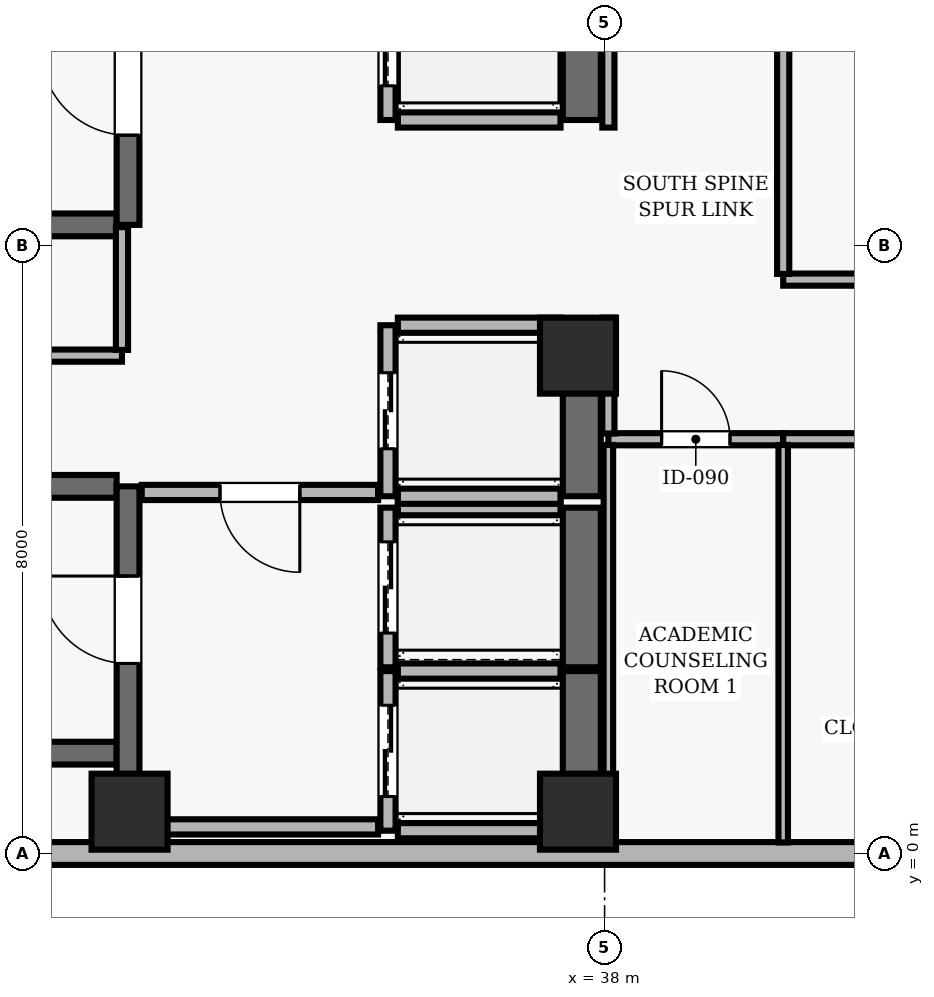
"""IFC4 building model, lengths in metres.
Left out: names, types, materials, properties, quantities, classifications, styles, units other than length and angle.
Written with IfcOpenShell. Run it as: python <this file> out.ifc"""

import sys

from ifc_helpers import new_model, si_unit, direction, frame, frame_2d, origin, origin_2d, place, context, subcontext, project, spatial, rectangle, extrude, element, fill, save


model = new_model("IFC4")
c1 = context("Model", 3, precision=1e-05, world=origin(), true_north=direction((0.0, 1.0)))
c2 = subcontext(c1, "Body", "Model", "MODEL_VIEW")
j1 = project(units=[si_unit("LENGTHUNIT", "METRE"), si_unit("PLANEANGLEUNIT", "RADIAN")], contexts=[c1])
p1 = place(None, origin())
s1 = spatial("IfcSite", under=j1, at=p1, CompositionType="ELEMENT")
p2 = place(p1, origin())
s2 = spatial("IfcBuilding", under=s1, at=p2, CompositionType="ELEMENT")
p3 = place(p2, frame((0.0, 0.0, 226.5)))
s3 = spatial("IfcBuildingStorey", under=s2, at=p3, CompositionType="ELEMENT", Elevation=226.5)
for number, where, z_axis, x_axis in (
    (1, (31.75, 0.55, 0.0), (0.0, 0.0, 1.0), (1.0, 0.0, 0.0)),
    (2, (37.65, 0.55, 0.0), (0.0, 0.0, 1.0), (1.0, 0.0, 0.0)),
    (3, (37.65, 6.55, 0.0), (0.0, 0.0, 1.0), (1.0, 0.0, 0.0)),
):
    element("IfcColumn", number, at=place(p3, frame(where, z_axis=z_axis, x_axis=x_axis)), inside=s3, PredefinedType="COLUMN", context=c2, shape_type="SweptSolid", body=[
        extrude(rectangle(XDim=1.0, YDim=1.0, at=origin_2d()), origin(), (0.0, 0.0, 1.0), 3.9),
    ])
p4 = place(p3, frame((24.5, 0.0, 0.0), z_axis=(0.0, 0.0, 1.0), x_axis=(1.0, 0.0, 0.0)))
e4 = element("IfcWall", 4, at=p4, inside=s3, PredefinedType="SOLIDWALL", context=c2, shape_type="SweptSolid", body=[
    extrude(rectangle(XDim=38.2, YDim=0.3, at=frame_2d((19.1, 0.0))), origin(), (0.0, 0.0, 1.0), 3.69),
])
p5 = place(p4, frame((1.529, 0.0, 0.9)))
e5 = element("IfcOpeningElement", 5, at=p5, cuts=e4, PredefinedType="OPENING", context=c2, shape_type="SweptSolid", body=[
    extrude(rectangle(XDim=2.4, YDim=1.8, at=frame_2d((1.2, 0.9))), frame((0.0, 0.16, 0.0), z_axis=(0.0, -1.0, 0.0), x_axis=(1.0, 0.0, 0.0)), (0.0, 0.0, 1.0), 0.32),
])
p6 = place(p4, frame((17.9, 0.0, 0.9)))
e6 = element("IfcOpeningElement", 6, at=p6, cuts=e4, PredefinedType="OPENING", context=c2, shape_type="SweptSolid", body=[
    extrude(rectangle(XDim=2.4, YDim=1.8, at=frame_2d((1.2, 0.9))), frame((0.0, 0.16, 0.0), z_axis=(0.0, -1.0, 0.0), x_axis=(1.0, 0.0, 0.0)), (0.0, 0.0, 1.0), 0.32),
])
p7 = place(p4, frame((24.257, 0.0, 0.9)))
e7 = element("IfcOpeningElement", 7, at=p7, cuts=e4, PredefinedType="OPENING", context=c2, shape_type="SweptSolid", body=[
    extrude(rectangle(XDim=2.4, YDim=1.8, at=frame_2d((1.2, 0.9))), frame((0.0, 0.16, 0.0), z_axis=(0.0, -1.0, 0.0), x_axis=(1.0, 0.0, 0.0)), (0.0, 0.0, 1.0), 0.32),
])
p8 = place(p4, frame((28.364, 0.0, 0.9)))
e8 = element("IfcOpeningElement", 8, at=p8, cuts=e4, PredefinedType="OPENING", context=c2, shape_type="SweptSolid", body=[
    extrude(rectangle(XDim=2.4, YDim=1.8, at=frame_2d((1.2, 0.9))), frame((0.0, 0.16, 0.0), z_axis=(0.0, -1.0, 0.0), x_axis=(1.0, 0.0, 0.0)), (0.0, 0.0, 1.0), 0.32),
])
p9 = place(p4, frame((34.271, 0.0, 0.9)))
e9 = element("IfcOpeningElement", 9, at=p9, cuts=e4, PredefinedType="OPENING", context=c2, shape_type="SweptSolid", body=[
    extrude(rectangle(XDim=2.4, YDim=1.8, at=frame_2d((1.2, 0.9))), frame((0.0, 0.16, 0.0), z_axis=(0.0, -1.0, 0.0), x_axis=(1.0, 0.0, 0.0)), (0.0, 0.0, 1.0), 0.32),
])
for number, where, z_axis, x_axis in (
    (10, (31.58, 4.83, 0.0), (0.0, 0.0, 1.0), (-1.0, 0.0, 0.0)),
    (11, (23.22, 1.32, 0.0), (0.0, 0.0, 1.0), (1.0, 0.0, 0.0)),
):
    element("IfcWall", number, at=place(p3, frame(where, z_axis=z_axis, x_axis=x_axis)), inside=s3, PredefinedType="SHEAR", context=c2, shape_type="SweptSolid", body=[
        extrude(rectangle(XDim=8.36, YDim=0.3, at=frame_2d((4.18, 0.0))), origin(), (0.0, 0.0, 1.0), 3.69),
    ])
p10 = place(p3, frame((31.73, 0.96, 0.0), z_axis=(0.0, 0.0, 1.0), x_axis=(0.0, 1.0, 0.0)))
e12 = element("IfcWall", 12, at=p10, inside=s3, PredefinedType="SHEAR", context=c2, shape_type="SweptSolid", body=[
    extrude(rectangle(XDim=3.87, YDim=0.3, at=frame_2d((1.935, 0.0))), origin(), (0.0, 0.0, 1.0), 3.69),
])
p11 = place(p10, frame((1.54, 0.0, 0.0)))
e13 = element("IfcOpeningElement", 13, at=p11, cuts=e12, PredefinedType="OPENING", context=c2, shape_type="SweptSolid", body=[
    extrude(rectangle(XDim=1.15, YDim=2.15, at=frame_2d((0.575, 1.075))), frame((0.0, 0.16, 0.0), z_axis=(0.0, -1.0, 0.0), x_axis=(1.0, 0.0, 0.0)), (0.0, 0.0, 1.0), 0.32),
])
p12 = place(p3, frame((23.22, 8.27, 0.0), z_axis=(0.0, 0.0, 1.0), x_axis=(1.0, 0.0, 0.0)))
e14 = element("IfcWall", 14, at=p12, inside=s3, PredefinedType="SHEAR", context=c2, shape_type="SweptSolid", body=[
    extrude(rectangle(XDim=8.36, YDim=0.3, at=frame_2d((4.18, 0.0))), origin(), (0.0, 0.0, 1.0), 3.69),
])
p13 = place(p3, frame((31.73, 8.27, 0.0), z_axis=(0.0, 0.0, 1.0), x_axis=(0.0, 1.0, 0.0)))
e15 = element("IfcWall", 15, at=p13, inside=s3, PredefinedType="SHEAR", context=c2, shape_type="SweptSolid", body=[
    extrude(rectangle(XDim=3.51, YDim=0.3, at=frame_2d((1.755, 0.0))), origin(), (0.0, 0.0, 1.0), 3.69),
])
p14 = place(p13, frame((1.18, 0.0, 0.0)))
e16 = element("IfcOpeningElement", 16, at=p14, cuts=e15, PredefinedType="OPENING", context=c2, shape_type="SweptSolid", body=[
    extrude(rectangle(XDim=1.15, YDim=2.15, at=frame_2d((0.575, 1.075))), frame((0.0, 0.16, 0.0), z_axis=(0.0, -1.0, 0.0), x_axis=(1.0, 0.0, 0.0)), (0.0, 0.0, 1.0), 0.32),
])
p15 = place(p3, frame((35.15, 2.4, 0.0), z_axis=(0.0, 0.0, 1.0), x_axis=(0.0, -1.0, 0.0)))
e17 = element("IfcWall", 17, at=p15, inside=s3, PredefinedType="SOLIDWALL", context=c2, shape_type="SweptSolid", body=[
    extrude(rectangle(XDim=2.1, YDim=0.2, at=frame_2d((1.05, 0.0))), origin(), (0.0, 0.0, 1.0), 3.69),
])
p16 = place(p15, frame((0.45, 0.0, 0.0)))
e18 = element("IfcOpeningElement", 18, at=p16, cuts=e17, PredefinedType="OPENING", context=c2, shape_type="SweptSolid", body=[
    extrude(rectangle(XDim=1.2, YDim=2.15, at=frame_2d((0.6, 1.075))), frame((0.0, 0.11, 0.0), z_axis=(0.0, -1.0, 0.0), x_axis=(1.0, 0.0, 0.0)), (0.0, 0.0, 1.0), 0.22),
])
p17 = place(p3, frame((37.7, 0.3, 0.0), z_axis=(0.0, 0.0, 1.0), x_axis=(0.0, 1.0, 0.0)))
e19 = element("IfcWall", 19, at=p17, inside=s3, PredefinedType="SHEAR", context=c2, shape_type="SweptSolid", body=[
    extrude(rectangle(XDim=2.1, YDim=0.5, at=frame_2d((1.05, 0.0))), origin(), (0.0, 0.0, 1.0), 3.69),
])
for number, where, z_axis, x_axis in (
    (20, (35.28, 0.3, 0.0), (0.0, 0.0, 1.0), (1.0, 0.0, 0.0)),
    (21, (37.42, 2.4, 0.0), (0.0, 0.0, 1.0), (-1.0, 0.0, 0.0)),
):
    element("IfcWall", number, at=place(p3, frame(where, z_axis=z_axis, x_axis=x_axis)), inside=s3, PredefinedType="SOLIDWALL", context=c2, shape_type="SweptSolid", body=[
        extrude(rectangle(XDim=2.14, YDim=0.2, at=frame_2d((1.07, 0.0))), origin(), (0.0, 0.0, 1.0), 3.69),
    ])
p18 = place(p3, frame((35.15, 4.55, 0.0), z_axis=(0.0, 0.0, 1.0), x_axis=(0.0, -1.0, 0.0)))
e22 = element("IfcWall", 22, at=p18, inside=s3, PredefinedType="SOLIDWALL", context=c2, shape_type="SweptSolid", body=[
    extrude(rectangle(XDim=2.1, YDim=0.2, at=frame_2d((1.05, 0.0))), origin(), (0.0, 0.0, 1.0), 3.69),
])
p19 = place(p18, frame((0.45, 0.0, 0.0)))
e23 = element("IfcOpeningElement", 23, at=p19, cuts=e22, PredefinedType="OPENING", context=c2, shape_type="SweptSolid", body=[
    extrude(rectangle(XDim=1.2, YDim=2.15, at=frame_2d((0.6, 1.075))), frame((0.0, 0.11, 0.0), z_axis=(0.0, -1.0, 0.0), x_axis=(1.0, 0.0, 0.0)), (0.0, 0.0, 1.0), 0.22),
])
p20 = place(p3, frame((37.7, 2.45, 0.0), z_axis=(0.0, 0.0, 1.0), x_axis=(0.0, 1.0, 0.0)))
e24 = element("IfcWall", 24, at=p20, inside=s3, PredefinedType="SHEAR", context=c2, shape_type="SweptSolid", body=[
    extrude(rectangle(XDim=2.1, YDim=0.5, at=frame_2d((1.05, 0.0))), origin(), (0.0, 0.0, 1.0), 3.69),
])
p21 = place(p3, frame((37.42, 4.55, 0.0), z_axis=(0.0, 0.0, 1.0), x_axis=(-1.0, 0.0, 0.0)))
e25 = element("IfcWall", 25, at=p21, inside=s3, PredefinedType="SOLIDWALL", context=c2, shape_type="SweptSolid", body=[
    extrude(rectangle(XDim=2.14, YDim=0.2, at=frame_2d((1.07, 0.0))), origin(), (0.0, 0.0, 1.0), 3.69),
])
p22 = place(p3, frame((35.15, 6.95, 0.0), z_axis=(0.0, 0.0, 1.0), x_axis=(0.0, -1.0, 0.0)))
e26 = element("IfcWall", 26, at=p22, inside=s3, PredefinedType="SOLIDWALL", context=c2, shape_type="SweptSolid", body=[
    extrude(rectangle(XDim=2.25, YDim=0.2, at=frame_2d((1.125, 0.0))), origin(), (0.0, 0.0, 1.0), 3.69),
])
p23 = place(p22, frame((0.625, 0.0, 0.0)))
e27 = element("IfcOpeningElement", 27, at=p23, cuts=e26, PredefinedType="OPENING", context=c2, shape_type="SweptSolid", body=[
    extrude(rectangle(XDim=1.0, YDim=2.1, at=frame_2d((0.5, 1.05))), frame((0.0, 0.11, 0.0), z_axis=(0.0, -1.0, 0.0), x_axis=(1.0, 0.0, 0.0)), (0.0, 0.0, 1.0), 0.22),
])
p24 = place(p3, frame((37.7, 4.7, 0.0), z_axis=(0.0, 0.0, 1.0), x_axis=(0.0, 1.0, 0.0)))
e28 = element("IfcWall", 28, at=p24, inside=s3, PredefinedType="SHEAR", context=c2, shape_type="SweptSolid", body=[
    extrude(rectangle(XDim=2.25, YDim=0.5, at=frame_2d((1.125, 0.0))), origin(), (0.0, 0.0, 1.0), 3.69),
])
for number, where, z_axis, x_axis in (
    (29, (35.28, 4.7, 0.0), (0.0, 0.0, 1.0), (1.0, 0.0, 0.0)),
    (30, (37.42, 6.95, 0.0), (0.0, 0.0, 1.0), (-1.0, 0.0, 0.0)),
):
    element("IfcWall", number, at=place(p3, frame(where, z_axis=z_axis, x_axis=x_axis)), inside=s3, PredefinedType="SOLIDWALL", context=c2, shape_type="SweptSolid", body=[
        extrude(rectangle(XDim=2.14, YDim=0.2, at=frame_2d((1.07, 0.0))), origin(), (0.0, 0.0, 1.0), 3.69),
    ])
p25 = place(p3, frame((35.15, 11.55, 0.0), z_axis=(0.0, 0.0, 1.0), x_axis=(0.0, -1.0, 0.0)))
e31 = element("IfcWall", 31, at=p25, inside=s3, PredefinedType="SOLIDWALL", context=c2, shape_type="SweptSolid", body=[
    extrude(rectangle(XDim=1.9, YDim=0.2, at=frame_2d((0.95, 0.0))), origin(), (0.0, 0.0, 1.0), 3.69),
])
p26 = place(p25, frame((0.45, 0.0, 0.0)))
e32 = element("IfcOpeningElement", 32, at=p26, cuts=e31, PredefinedType="OPENING", context=c2, shape_type="SweptSolid", body=[
    extrude(rectangle(XDim=1.0, YDim=2.1, at=frame_2d((0.5, 1.05))), frame((0.0, 0.11, 0.0), z_axis=(0.0, -1.0, 0.0), x_axis=(1.0, 0.0, 0.0)), (0.0, 0.0, 1.0), 0.22),
])
p27 = place(p3, frame((37.7, 9.65, 0.0), z_axis=(0.0, 0.0, 1.0), x_axis=(0.0, 1.0, 0.0)))
e33 = element("IfcWall", 33, at=p27, inside=s3, PredefinedType="SHEAR", context=c2, shape_type="SweptSolid", body=[
    extrude(rectangle(XDim=1.9, YDim=0.5, at=frame_2d((0.95, 0.0))), origin(), (0.0, 0.0, 1.0), 3.69),
])
p28 = place(p3, frame((35.28, 9.65, 0.0), z_axis=(0.0, 0.0, 1.0), x_axis=(1.0, 0.0, 0.0)))
e34 = element("IfcWall", 34, at=p28, inside=s3, PredefinedType="SOLIDWALL", context=c2, shape_type="SweptSolid", body=[
    extrude(rectangle(XDim=2.14, YDim=0.2, at=frame_2d((1.07, 0.0))), origin(), (0.0, 0.0, 1.0), 3.69),
])
p29 = place(p3, frame((31.65, 0.35, 0.0), z_axis=(0.0, 0.0, 1.0), x_axis=(1.0, 0.0, 0.0)))
e35 = element("IfcWall", 35, at=p29, inside=s3, PredefinedType="SOLIDWALL", context=c2, shape_type="SweptSolid", body=[
    extrude(rectangle(XDim=3.37, YDim=0.2, at=frame_2d((1.685, 0.0))), origin(), (0.0, 0.0, 1.0), 3.69),
])
p30 = place(p3, frame((31.65, 6.55, 0.0), z_axis=(0.0, 0.0, 1.0), x_axis=(-1.0, 0.0, 0.0)))
e36 = element("IfcWall", 36, at=p30, inside=s3, PredefinedType="PARTITIONING", context=c2, shape_type="SweptSolid", body=[
    extrude(rectangle(XDim=4.75, YDim=0.16, at=frame_2d((2.375, 0.0))), origin(), (0.0, 0.0, 1.0), 3.69),
])
p31 = place(p30, frame((1.935, 0.0, 0.0)))
e37 = element("IfcOpeningElement", 37, at=p31, cuts=e36, PredefinedType="OPENING", context=c2, shape_type="SweptSolid", body=[
    extrude(rectangle(XDim=0.88, YDim=2.1, at=frame_2d((0.44, 1.05))), frame((0.0, 0.09, 0.0), z_axis=(0.0, -1.0, 0.0), x_axis=(1.0, 0.0, 0.0)), (0.0, 0.0, 1.0), 0.18),
])
p32 = place(p3, frame((35.02, 4.75, 0.0), z_axis=(0.0, 0.0, 1.0), x_axis=(-1.0, 0.0, 0.0)))
e38 = element("IfcWall", 38, at=p32, inside=s3, PredefinedType="SOLIDWALL", context=c2, shape_type="SweptSolid", body=[
    extrude(rectangle(XDim=3.11, YDim=0.2, at=frame_2d((1.555, 0.0))), origin(), (0.0, 0.0, 1.0), 3.69),
])
p33 = place(p32, frame((1.03, 0.0, 0.0)))
e39 = element("IfcOpeningElement", 39, at=p33, cuts=e38, PredefinedType="OPENING", context=c2, shape_type="SweptSolid", body=[
    extrude(rectangle(XDim=1.05, YDim=2.15, at=frame_2d((0.525, 1.075))), frame((0.0, 0.11, 0.0), z_axis=(0.0, -1.0, 0.0), x_axis=(1.0, 0.0, 0.0)), (0.0, 0.0, 1.0), 0.22),
])
p34 = place(p3, frame((38.05, 5.45, 0.0), z_axis=(0.0, 0.0, 1.0), x_axis=(1.0, 0.0, 0.0)))
e40 = element("IfcWall", 40, at=p34, inside=s3, PredefinedType="PARTITIONING", context=c2, shape_type="SweptSolid", body=[
    extrude(rectangle(XDim=2.3, YDim=0.16, at=frame_2d((1.15, 0.0))), origin(), (0.0, 0.0, 1.0), 3.372),
])
p35 = place(p34, frame((0.7, 0.0, 0.0)))
e41 = element("IfcOpeningElement", 41, at=p35, cuts=e40, PredefinedType="OPENING", context=c2, shape_type="SweptSolid", body=[
    extrude(rectangle(XDim=0.9, YDim=2.1, at=frame_2d((0.45, 1.05))), frame((0.0, 0.09, 0.0), z_axis=(0.0, -1.0, 0.0), x_axis=(1.0, 0.0, 0.0)), (0.0, 0.0, 1.0), 0.18),
])
p36 = place(p3, frame((40.35, 5.45, 0.0), z_axis=(0.0, 0.0, 1.0), x_axis=(1.0, 0.0, 0.0)))
e42 = element("IfcWall", 42, at=p36, inside=s3, PredefinedType="PARTITIONING", context=c2, shape_type="SweptSolid", body=[
    extrude(rectangle(XDim=7.45, YDim=0.16, at=frame_2d((3.725, 0.0))), origin(), (0.0, 0.0, 1.0), 3.372),
])
p37 = place(p36, frame((3.275, 0.0, 0.0)))
e43 = element("IfcOpeningElement", 43, at=p37, cuts=e42, PredefinedType="OPENING", context=c2, shape_type="SweptSolid", body=[
    extrude(rectangle(XDim=0.9, YDim=2.1, at=frame_2d((0.45, 1.05))), frame((0.0, 0.09, 0.0), z_axis=(0.0, -1.0, 0.0), x_axis=(1.0, 0.0, 0.0)), (0.0, 0.0, 1.0), 0.18),
])
p38 = place(p3, frame((47.8, 7.55, 0.0), z_axis=(0.0, 0.0, 1.0), x_axis=(-1.0, 0.0, 0.0)))
e44 = element("IfcWall", 44, at=p38, inside=s3, PredefinedType="PARTITIONING", context=c2, shape_type="SweptSolid", body=[
    extrude(rectangle(XDim=7.45, YDim=0.16, at=frame_2d((3.725, 0.0))), origin(), (0.0, 0.0, 1.0), 3.146),
])
p39 = place(p3, frame((31.65, 8.24, 0.0), z_axis=(0.0, 0.0, 1.0), x_axis=(0.0, -1.0, 0.0)))
e45 = element("IfcWall", 45, at=p39, inside=s3, PredefinedType="PARTITIONING", context=c2, shape_type="SweptSolid", body=[
    extrude(rectangle(XDim=1.615, YDim=0.16, at=frame_2d((0.808, 0.0))), origin(), (0.0, 0.0, 1.0), 3.69),
])
p40 = place(p3, frame((38.05, 5.375, 0.0), z_axis=(0.0, 0.0, 1.0), x_axis=(0.0, -1.0, 0.0)))
e46 = element("IfcWall", 46, at=p40, inside=s3, PredefinedType="PARTITIONING", context=c2, shape_type="SweptSolid", body=[
    extrude(rectangle(XDim=5.23, YDim=0.125, at=frame_2d((2.615, 0.0))), origin(), (0.0, 0.0, 1.0), 3.146),
])
p41 = place(p3, frame((38.05, 7.05, 0.0), z_axis=(0.0, 0.0, 1.0), x_axis=(0.0, -1.0, 0.0)))
e47 = element("IfcWall", 47, at=p41, inside=s3, PredefinedType="PARTITIONING", context=c2, shape_type="SweptSolid", body=[
    extrude(rectangle(XDim=1.525, YDim=0.16, at=frame_2d((0.763, 0.0))), origin(), (0.0, 0.0, 1.0), 3.146),
])
p42 = place(p3, frame((38.05, 15.925, 0.0), z_axis=(0.0, 0.0, 1.0), x_axis=(0.0, -1.0, 0.0)))
e48 = element("IfcWall", 48, at=p42, inside=s3, PredefinedType="PARTITIONING", context=c2, shape_type="SweptSolid", body=[
    extrude(rectangle(XDim=6.375, YDim=0.16, at=frame_2d((3.188, 0.0))), origin(), (0.0, 0.0, 1.0), 3.146),
])
p43 = place(p3, frame((40.35, 0.145, 0.0), z_axis=(0.0, 0.0, 1.0), x_axis=(0.0, 1.0, 0.0)))
e49 = element("IfcWall", 49, at=p43, inside=s3, PredefinedType="PARTITIONING", context=c2, shape_type="SweptSolid", body=[
    extrude(rectangle(XDim=5.23, YDim=0.125, at=frame_2d((2.615, 0.0))), origin(), (0.0, 0.0, 1.0), 3.69),
])
p44 = place(p3, frame((40.35, 7.625, 0.0), z_axis=(0.0, 0.0, 1.0), x_axis=(0.0, 1.0, 0.0)))
e50 = element("IfcWall", 50, at=p44, inside=s3, PredefinedType="PARTITIONING", context=c2, shape_type="SweptSolid", body=[
    extrude(rectangle(XDim=8.3, YDim=0.16, at=frame_2d((4.15, 0.0))), origin(), (0.0, 0.0, 1.0), 3.69),
])
p45 = place(p44, frame((3.7, 0.0, 0.0)))
e51 = element("IfcOpeningElement", 51, at=p45, cuts=e50, PredefinedType="OPENING", context=c2, shape_type="SweptSolid", body=[
    extrude(rectangle(XDim=0.9, YDim=2.1, at=frame_2d((0.45, 1.05))), frame((0.0, 0.09, 0.0), z_axis=(0.0, -1.0, 0.0), x_axis=(1.0, 0.0, 0.0)), (0.0, 0.0, 1.0), 0.18),
])
p46 = place(p11, origin())
e52 = element("IfcDoor", 52, at=p46, inside=s3, OperationType="SINGLE_SWING_RIGHT", PredefinedType="DOOR", context=c2, shape_type="SweptSolid", body=[
    extrude(rectangle(XDim=1.15, YDim=2.15, at=frame_2d((0.575, 1.075))), frame((0.0, 0.025, 0.0), z_axis=(0.0, -1.0, 0.0), x_axis=(1.0, 0.0, 0.0)), (0.0, 0.0, 1.0), 0.05),
])
fill(e13, e52)
p47 = place(p14, origin())
e53 = element("IfcDoor", 53, at=p47, inside=s3, OperationType="SINGLE_SWING_RIGHT", PredefinedType="DOOR", context=c2, shape_type="SweptSolid", body=[
    extrude(rectangle(XDim=1.15, YDim=2.15, at=frame_2d((0.575, 1.075))), frame((0.0, 0.025, 0.0), z_axis=(0.0, -1.0, 0.0), x_axis=(1.0, 0.0, 0.0)), (0.0, 0.0, 1.0), 0.05),
])
fill(e16, e53)
p48 = place(p16, origin())
e54 = element("IfcDoor", 54, at=p48, inside=s3, OperationType="DOUBLE_DOOR_SLIDING", PredefinedType="DOOR", context=c2, shape_type="SweptSolid", body=[
    extrude(rectangle(XDim=1.2, YDim=2.15, at=frame_2d((0.6, 1.075))), frame((0.0, 0.025, 0.0), z_axis=(0.0, -1.0, 0.0), x_axis=(1.0, 0.0, 0.0)), (0.0, 0.0, 1.0), 0.05),
])
fill(e18, e54)
p49 = place(p19, origin())
e55 = element("IfcDoor", 55, at=p49, inside=s3, OperationType="DOUBLE_DOOR_SLIDING", PredefinedType="DOOR", context=c2, shape_type="SweptSolid", body=[
    extrude(rectangle(XDim=1.2, YDim=2.15, at=frame_2d((0.6, 1.075))), frame((0.0, 0.025, 0.0), z_axis=(0.0, -1.0, 0.0), x_axis=(1.0, 0.0, 0.0)), (0.0, 0.0, 1.0), 0.05),
])
fill(e23, e55)
p50 = place(p23, origin())
e56 = element("IfcDoor", 56, at=p50, inside=s3, OperationType="DOUBLE_DOOR_SLIDING", PredefinedType="DOOR", context=c2, shape_type="SweptSolid", body=[
    extrude(rectangle(XDim=1.0, YDim=2.1, at=frame_2d((0.5, 1.05))), frame((0.0, 0.025, 0.0), z_axis=(0.0, -1.0, 0.0), x_axis=(1.0, 0.0, 0.0)), (0.0, 0.0, 1.0), 0.05),
])
fill(e27, e56)
p51 = place(p26, origin())
e57 = element("IfcDoor", 57, at=p51, inside=s3, OperationType="DOUBLE_DOOR_SLIDING", PredefinedType="DOOR", context=c2, shape_type="SweptSolid", body=[
    extrude(rectangle(XDim=1.0, YDim=2.1, at=frame_2d((0.5, 1.05))), frame((0.0, 0.025, 0.0), z_axis=(0.0, -1.0, 0.0), x_axis=(1.0, 0.0, 0.0)), (0.0, 0.0, 1.0), 0.05),
])
fill(e32, e57)
p52 = place(p33, origin())
e58 = element("IfcDoor", 58, at=p52, inside=s3, OperationType="SINGLE_SWING_LEFT", PredefinedType="DOOR", context=c2, shape_type="SweptSolid", body=[
    extrude(rectangle(XDim=1.05, YDim=2.15, at=frame_2d((0.525, 1.075))), frame((0.0, 0.025, 0.0), z_axis=(0.0, -1.0, 0.0), x_axis=(1.0, 0.0, 0.0)), (0.0, 0.0, 1.0), 0.05),
])
fill(e39, e58)
p53 = place(p35, origin())
e59 = element("IfcDoor", 59, at=p53, inside=s3, OperationType="SINGLE_SWING_LEFT", PredefinedType="DOOR", context=c2, shape_type="SweptSolid", body=[
    extrude(rectangle(XDim=0.9, YDim=2.1, at=frame_2d((0.45, 1.05))), frame((0.0, 0.025, 0.0), z_axis=(0.0, -1.0, 0.0), x_axis=(1.0, 0.0, 0.0)), (0.0, 0.0, 1.0), 0.05),
])
fill(e41, e59)
save(model, sys.argv[1])
